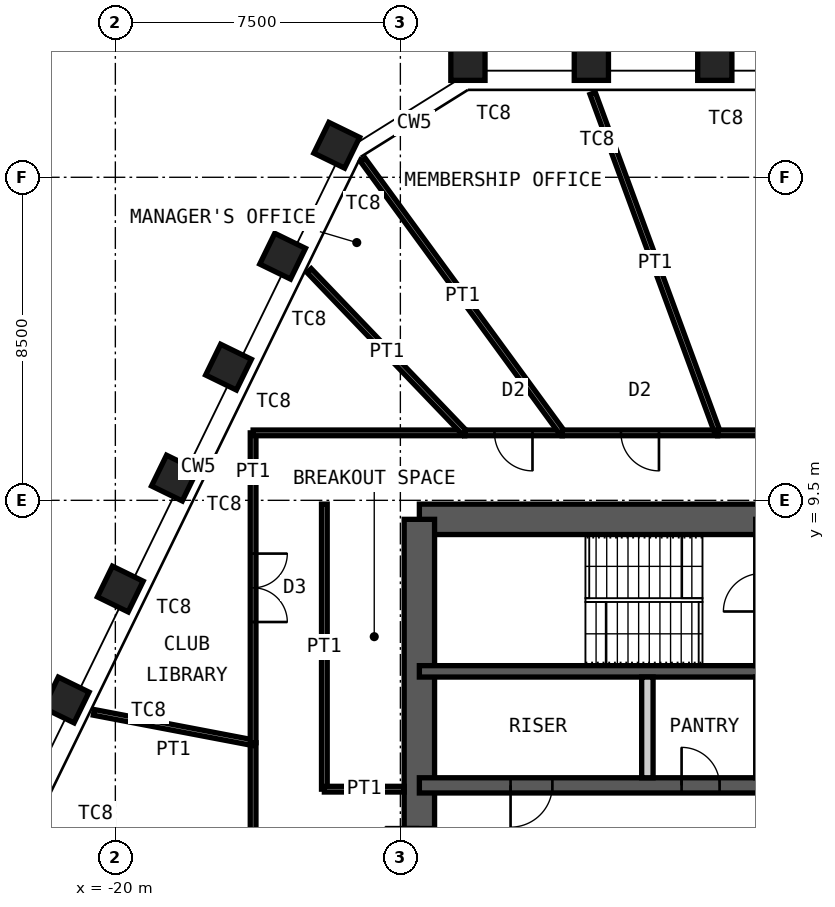
"""IFC4 building model, lengths in metres.
Left out: names, types, materials, properties, quantities, classifications, styles, units other than length and angle.
Written with IfcOpenShell. Run it as: python <this file> out.ifc"""

import sys

from ifc_helpers import new_model, si_unit, direction, frame, frame_2d, origin, origin_2d, place, context, subcontext, project, spatial, rectangle, hollow_rectangle, extrude, element, fill, save


model = new_model("IFC4")
c1 = context("Model", 3, precision=1e-05, world=origin(), true_north=direction((0.0, 1.0)))
c2 = subcontext(c1, "Body", "Model", "MODEL_VIEW")
j1 = project(units=[si_unit("LENGTHUNIT", "METRE"), si_unit("PLANEANGLEUNIT", "RADIAN")], contexts=[c1])
p1 = place(None, origin())
s1 = spatial("IfcSite", under=j1, at=p1, CompositionType="ELEMENT")
p2 = place(p1, origin())
s2 = spatial("IfcBuilding", under=s1, at=p2, CompositionType="ELEMENT")
p3 = place(p2, frame((0.0, 0.0, 320.8)))
s3 = spatial("IfcBuildingStorey", under=s2, at=p3, CompositionType="ELEMENT", Elevation=320.8)
for number, where, z_axis, x_axis in (
    (1, (-10.722, 21.0, 0.0), (0.0, 0.0, 1.0), (-1.0, 0.0, 0.0)),
    (2, (-7.474, 21.0, 0.0), (0.0, 0.0, 1.0), (-1.0, 0.0, 0.0)),
    (3, (-4.226, 21.0, 0.0), (0.0, 0.0, 1.0), (-1.0, 0.0, 0.0)),
    (4, (-21.293, 4.246, 0.0), (0.0, 0.0, 1.0), (-0.438, -0.899, 0.0)),
    (5, (-19.87, 7.166, 0.0), (0.0, 0.0, 1.0), (-0.438, -0.899, 0.0)),
    (6, (-18.446, 10.085, 0.0), (0.0, 0.0, 1.0), (-0.438, -0.899, 0.0)),
    (7, (-17.022, 13.004, 0.0), (0.0, 0.0, 1.0), (-0.438, -0.899, 0.0)),
    (8, (-15.598, 15.924, 0.0), (0.0, 0.0, 1.0), (-0.438, -0.899, 0.0)),
    (9, (-14.174, 18.843, 0.0), (0.0, 0.0, 1.0), (-0.438, -0.899, 0.0)),
):
    element("IfcColumn", number, at=place(p3, frame(where, z_axis=z_axis, x_axis=x_axis)), inside=s3, PredefinedType="COLUMN", context=c2, shape_type="SweptSolid", body=[
        extrude(hollow_rectangle(XDim=0.9, YDim=0.9, WallThickness=0.05, at=origin_2d()), origin(), (0.0, 0.0, 1.0), 4.2),
    ])
p4 = place(p3, frame((-12.0, 9.0, 0.0), z_axis=(0.0, 0.0, 1.0), x_axis=(1.0, 0.0, 0.0)))
e10 = element("IfcWall", 10, at=p4, inside=s3, PredefinedType="SHEAR", context=c2, shape_type="SweptSolid", body=[
    extrude(rectangle(XDim=24.0, YDim=0.8, at=frame_2d((12.0, 0.0))), origin(), (0.0, 0.0, 1.0), 4.2),
])
p5 = place(p4, frame((10.4, 0.0, 0.0)))
e11 = element("IfcOpeningElement", 11, at=p5, cuts=e10, PredefinedType="OPENING", context=c2, shape_type="SweptSolid", body=[
    extrude(rectangle(XDim=1.0, YDim=2.1, at=frame_2d((0.5, 1.05))), frame((0.0, 0.41, 0.0), z_axis=(0.0, -1.0, 0.0), x_axis=(1.0, 0.0, 0.0)), (0.0, 0.0, 1.0), 0.82),
])
p6 = place(p4, frame((17.6, 0.0, 0.0)))
e12 = element("IfcOpeningElement", 12, at=p6, cuts=e10, PredefinedType="OPENING", context=c2, shape_type="SweptSolid", body=[
    extrude(rectangle(XDim=0.9, YDim=2.1, at=frame_2d((0.45, 1.05))), frame((0.0, 0.41, 0.0), z_axis=(0.0, -1.0, 0.0), x_axis=(1.0, 0.0, 0.0)), (0.0, 0.0, 1.0), 0.82),
])
p7 = place(p4, frame((21.9, 0.0, 0.0)))
e13 = element("IfcOpeningElement", 13, at=p7, cuts=e10, PredefinedType="OPENING", context=c2, shape_type="SweptSolid", body=[
    extrude(rectangle(XDim=0.9, YDim=2.1, at=frame_2d((0.45, 1.05))), frame((0.0, 0.41, 0.0), z_axis=(0.0, -1.0, 0.0), x_axis=(1.0, 0.0, 0.0)), (0.0, 0.0, 1.0), 0.82),
])
p8 = place(p3, frame((-12.0, -9.0, 0.0), z_axis=(0.0, 0.0, 1.0), x_axis=(0.0, 1.0, 0.0)))
e14 = element("IfcWall", 14, at=p8, inside=s3, PredefinedType="SHEAR", context=c2, shape_type="SweptSolid", body=[
    extrude(rectangle(XDim=18.0, YDim=0.8, at=frame_2d((9.0, 0.0))), origin(), (0.0, 0.0, 1.0), 4.2),
])
p9 = place(p8, frame((8.1, 0.0, 0.0)))
e15 = element("IfcOpeningElement", 15, at=p9, cuts=e14, PredefinedType="OPENING", context=c2, shape_type="SweptSolid", body=[
    extrude(rectangle(XDim=1.8, YDim=2.1, at=frame_2d((0.9, 1.05))), frame((0.0, 0.41, 0.0), z_axis=(0.0, -1.0, 0.0), x_axis=(1.0, 0.0, 0.0)), (0.0, 0.0, 1.0), 0.82),
])
p10 = place(p3, frame((-12.0, 5.0, 0.0), z_axis=(0.0, 0.0, 1.0), x_axis=(1.0, 0.0, 0.0)))
e16 = element("IfcWall", 16, at=p10, inside=s3, PredefinedType="SHEAR", context=c2, shape_type="SweptSolid", body=[
    extrude(rectangle(XDim=24.0, YDim=0.3, at=frame_2d((12.0, 0.0))), origin(), (0.0, 0.0, 1.0), 4.2),
])
p11 = place(p3, frame((-12.0, 2.0, 0.0), z_axis=(0.0, 0.0, 1.0), x_axis=(1.0, 0.0, 0.0)))
e17 = element("IfcWall", 17, at=p11, inside=s3, PredefinedType="SHEAR", context=c2, shape_type="SweptSolid", body=[
    extrude(rectangle(XDim=24.0, YDim=0.4, at=frame_2d((12.0, 0.0))), origin(), (0.0, 0.0, 1.0), 4.2),
])
p12 = place(p11, frame((2.4, 0.0, 0.0)))
e18 = element("IfcOpeningElement", 18, at=p12, cuts=e17, PredefinedType="OPENING", context=c2, shape_type="SweptSolid", body=[
    extrude(rectangle(XDim=1.1, YDim=2.1, at=frame_2d((0.55, 1.05))), frame((0.0, 0.21, 0.0), z_axis=(0.0, -1.0, 0.0), x_axis=(1.0, 0.0, 0.0)), (0.0, 0.0, 1.0), 0.42),
])
p13 = place(p11, frame((22.0, 0.0, 0.0)))
e19 = element("IfcOpeningElement", 19, at=p13, cuts=e17, PredefinedType="OPENING", context=c2, shape_type="SweptSolid", body=[
    extrude(rectangle(XDim=1.1, YDim=2.1, at=frame_2d((0.55, 1.05))), frame((0.0, 0.21, 0.0), z_axis=(0.0, -1.0, 0.0), x_axis=(1.0, 0.0, 0.0)), (0.0, 0.0, 1.0), 0.42),
])
p14 = place(p11, frame((10.15, 0.0, 0.0)))
e20 = element("IfcOpeningElement", 20, at=p14, cuts=e17, PredefinedType="OPENING", context=c2, shape_type="SweptSolid", body=[
    extrude(rectangle(XDim=1.0, YDim=2.1, at=frame_2d((0.5, 1.05))), frame((0.0, 0.21, 0.0), z_axis=(0.0, -1.0, 0.0), x_axis=(1.0, 0.0, 0.0)), (0.0, 0.0, 1.0), 0.42),
])
p15 = place(p11, frame((6.9, 0.0, 0.0)))
e21 = element("IfcOpeningElement", 21, at=p15, cuts=e17, PredefinedType="OPENING", context=c2, shape_type="SweptSolid", body=[
    extrude(rectangle(XDim=1.0, YDim=2.1, at=frame_2d((0.5, 1.05))), frame((0.0, 0.21, 0.0), z_axis=(0.0, -1.0, 0.0), x_axis=(1.0, 0.0, 0.0)), (0.0, 0.0, 1.0), 0.42),
])
p16 = place(p11, frame((13.35, 0.0, 0.0)))
e22 = element("IfcOpeningElement", 22, at=p16, cuts=e17, PredefinedType="OPENING", context=c2, shape_type="SweptSolid", body=[
    extrude(rectangle(XDim=1.1, YDim=2.4, at=frame_2d((0.55, 1.2))), frame((0.0, 0.21, 0.0), z_axis=(0.0, -1.0, 0.0), x_axis=(1.0, 0.0, 0.0)), (0.0, 0.0, 1.0), 0.42),
])
p17 = place(p11, frame((16.15, 0.0, 0.0)))
e23 = element("IfcOpeningElement", 23, at=p17, cuts=e17, PredefinedType="OPENING", context=c2, shape_type="SweptSolid", body=[
    extrude(rectangle(XDim=1.1, YDim=2.4, at=frame_2d((0.55, 1.2))), frame((0.0, 0.21, 0.0), z_axis=(0.0, -1.0, 0.0), x_axis=(1.0, 0.0, 0.0)), (0.0, 0.0, 1.0), 0.42),
])
p18 = place(p11, frame((19.0, 0.0, 0.0)))
e24 = element("IfcOpeningElement", 24, at=p18, cuts=e17, PredefinedType="OPENING", context=c2, shape_type="SweptSolid", body=[
    extrude(rectangle(XDim=1.0, YDim=2.1, at=frame_2d((0.5, 1.05))), frame((0.0, 0.21, 0.0), z_axis=(0.0, -1.0, 0.0), x_axis=(1.0, 0.0, 0.0)), (0.0, 0.0, 1.0), 0.42),
])
p19 = place(p3, frame((-6.0, 2.2, 0.0), z_axis=(0.0, 0.0, 1.0), x_axis=(0.0, 1.0, 0.0)))
e25 = element("IfcWall", 25, at=p19, inside=s3, PredefinedType="PARTITIONING", context=c2, shape_type="SweptSolid", body=[
    extrude(rectangle(XDim=2.65, YDim=0.3, at=frame_2d((1.325, 0.0))), origin(), (0.0, 0.0, 1.0), 3.98),
])
p20 = place(p3, frame((-16.375, -4.324, 0.0), z_axis=(0.0, 0.0, 1.0), x_axis=(0.0, 1.0, 0.0)))
e26 = element("IfcWall", 26, at=p20, inside=s3, PredefinedType="PARTITIONING", context=c2, shape_type="SweptSolid", body=[
    extrude(rectangle(XDim=7.446, YDim=0.15, at=frame_2d((3.723, 0.0))), origin(), (0.0, 0.0, 1.0), 4.03),
])
p21 = place(p20, frame((3.223, 0.0, 0.0)))
e27 = element("IfcOpeningElement", 27, at=p21, cuts=e26, PredefinedType="OPENING", context=c2, shape_type="SweptSolid", body=[
    extrude(rectangle(XDim=1.0, YDim=2.4, at=frame_2d((0.5, 1.2))), frame((0.0, 0.085, 0.0), z_axis=(0.0, -1.0, 0.0), x_axis=(1.0, 0.0, 0.0)), (0.0, 0.0, 1.0), 0.17),
])
p22 = place(p3, frame((-20.566, 3.921, 0.0), z_axis=(0.0, 0.0, 1.0), x_axis=(0.982305997167, -0.187283015595, 0.0)))
e28 = element("IfcWall", 28, at=p22, inside=s3, PredefinedType="PARTITIONING", context=c2, shape_type="SweptSolid", body=[
    extrude(rectangle(XDim=4.267, YDim=0.15, at=frame_2d((2.133, 0.0))), origin(), (0.0, 0.0, 1.0), 3.33),
])
p23 = place(p3, frame((-16.375, 3.122, 0.0), z_axis=(0.0, 0.0, 1.0), x_axis=(0.0, 1.0, 0.0)))
e29 = element("IfcWall", 29, at=p23, inside=s3, PredefinedType="PARTITIONING", context=c2, shape_type="SweptSolid", body=[
    extrude(rectangle(XDim=8.153, YDim=0.15, at=frame_2d((4.077, 0.0))), origin(), (0.0, 0.0, 1.0), 4.03),
])
p24 = place(p23, frame((3.177, 0.0, 0.0)))
e30 = element("IfcOpeningElement", 30, at=p24, cuts=e29, PredefinedType="OPENING", context=c2, shape_type="SweptSolid", body=[
    extrude(rectangle(XDim=1.8, YDim=2.4, at=frame_2d((0.9, 1.2))), frame((0.0, 0.085, 0.0), z_axis=(0.0, -1.0, 0.0), x_axis=(1.0, 0.0, 0.0)), (0.0, 0.0, 1.0), 0.17),
])
p25 = place(p3, frame((-16.375, 11.275, 0.0), z_axis=(0.0, 0.0, 1.0), x_axis=(1.0, 0.0, 0.0)))
e31 = element("IfcWall", 31, at=p25, inside=s3, PredefinedType="PARTITIONING", context=c2, shape_type="SweptSolid", body=[
    extrude(rectangle(XDim=5.568, YDim=0.15, at=frame_2d((2.784, 0.0))), origin(), (0.0, 0.0, 1.0), 4.03),
])
p26 = place(p3, frame((-14.9, 15.544, 0.0), z_axis=(0.0, 0.0, 1.0), x_axis=(0.691984258941, -0.72191258846, 0.0)))
e32 = element("IfcWall", 32, at=p26, inside=s3, PredefinedType="PARTITIONING", context=c2, shape_type="SweptSolid", body=[
    extrude(rectangle(XDim=5.914, YDim=0.15, at=frame_2d((2.957, 0.0))), origin(), (0.0, 0.0, 1.0), 4.03),
])
p27 = place(p3, frame((-10.807, 11.275, 0.0), z_axis=(0.0, 0.0, 1.0), x_axis=(1.0, 0.0, 0.0)))
e33 = element("IfcWall", 33, at=p27, inside=s3, PredefinedType="PARTITIONING", context=c2, shape_type="SweptSolid", body=[
    extrude(rectangle(XDim=2.568, YDim=0.15, at=frame_2d((1.284, 0.0))), origin(), (0.0, 0.0, 1.0), 4.03),
])
p28 = place(p27, frame((0.784, 0.0, 0.0)))
e34 = element("IfcOpeningElement", 34, at=p28, cuts=e33, PredefinedType="OPENING", context=c2, shape_type="SweptSolid", body=[
    extrude(rectangle(XDim=1.0, YDim=2.4, at=frame_2d((0.5, 1.2))), frame((0.0, 0.085, 0.0), z_axis=(0.0, -1.0, 0.0), x_axis=(1.0, 0.0, 0.0)), (0.0, 0.0, 1.0), 0.17),
])
p29 = place(p3, frame((-13.486, 18.455, 0.0), z_axis=(0.0, 0.0, 1.0), x_axis=(0.589986991866, -0.80741275035, 0.0)))
e35 = element("IfcWall", 35, at=p29, inside=s3, PredefinedType="PARTITIONING", context=c2, shape_type="SweptSolid", body=[
    extrude(rectangle(XDim=8.893, YDim=0.15, at=frame_2d((4.447, 0.0))), origin(), (0.0, 0.0, 1.0), 2.93),
])
p30 = place(p3, frame((-8.239, 11.275, 0.0), z_axis=(0.0, 0.0, 1.0), x_axis=(1.0, 0.0, 0.0)))
e36 = element("IfcWall", 36, at=p30, inside=s3, PredefinedType="PARTITIONING", context=c2, shape_type="SweptSolid", body=[
    extrude(rectangle(XDim=4.088, YDim=0.15, at=frame_2d((2.044, 0.0))), origin(), (0.0, 0.0, 1.0), 4.03),
])
p31 = place(p30, frame((1.544, 0.0, 0.0)))
e37 = element("IfcOpeningElement", 37, at=p31, cuts=e36, PredefinedType="OPENING", context=c2, shape_type="SweptSolid", body=[
    extrude(rectangle(XDim=1.0, YDim=2.4, at=frame_2d((0.5, 1.2))), frame((0.0, 0.085, 0.0), z_axis=(0.0, -1.0, 0.0), x_axis=(1.0, 0.0, 0.0)), (0.0, 0.0, 1.0), 0.17),
])
p32 = place(p3, frame((-7.44, 20.206, 0.0), z_axis=(0.0, 0.0, 1.0), x_axis=(0.345511582319, -0.93841448544, 0.0)))
e38 = element("IfcWall", 38, at=p32, inside=s3, PredefinedType="PARTITIONING", context=c2, shape_type="SweptSolid", body=[
    extrude(rectangle(XDim=9.517, YDim=0.15, at=frame_2d((4.759, 0.0))), origin(), (0.0, 0.0, 1.0), 3.33),
])
p33 = place(p3, frame((-4.151, 11.275, 0.0), z_axis=(0.0, 0.0, 1.0), x_axis=(1.0, 0.0, 0.0)))
e39 = element("IfcWall", 39, at=p33, inside=s3, PredefinedType="PARTITIONING", context=c2, shape_type="SweptSolid", body=[
    extrude(rectangle(XDim=7.216, YDim=0.15, at=frame_2d((3.608, 0.0))), origin(), (0.0, 0.0, 1.0), 4.03),
])
p34 = place(p33, frame((2.708, 0.0, 0.0)))
e40 = element("IfcOpeningElement", 40, at=p34, cuts=e39, PredefinedType="OPENING", context=c2, shape_type="SweptSolid", body=[
    extrude(rectangle(XDim=1.8, YDim=2.4, at=frame_2d((0.9, 1.2))), frame((0.0, 0.085, 0.0), z_axis=(0.0, -1.0, 0.0), x_axis=(1.0, 0.0, 0.0)), (0.0, 0.0, 1.0), 0.17),
])
p35 = place(p3, frame((-14.5, 1.9, 0.0), z_axis=(0.0, 0.0, 1.0), x_axis=(0.0, 1.0, 0.0)))
e41 = element("IfcWall", 41, at=p35, inside=s3, PredefinedType="PARTITIONING", context=c2, shape_type="SweptSolid", body=[
    extrude(rectangle(XDim=7.5, YDim=0.15, at=frame_2d((3.75, 0.0))), origin(), (0.0, 0.0, 1.0), 4.03),
])
p36 = place(p3, frame((-12.4, 1.9, 0.0), z_axis=(0.0, 0.0, 1.0), x_axis=(-1.0, 0.0, 0.0)))
e42 = element("IfcWall", 42, at=p36, inside=s3, PredefinedType="PARTITIONING", context=c2, shape_type="SweptSolid", body=[
    extrude(rectangle(XDim=2.1, YDim=0.15, at=frame_2d((1.05, 0.0))), origin(), (0.0, 0.0, 1.0), 3.53),
])
p37 = place(p12, origin())
e43 = element("IfcDoor", 43, at=p37, inside=s3, OperationType="SINGLE_SWING_LEFT", PredefinedType="DOOR", context=c2, shape_type="SweptSolid", body=[
    extrude(rectangle(XDim=1.1, YDim=2.1, at=frame_2d((0.55, 1.05))), frame((0.0, 0.025, 0.0), z_axis=(0.0, -1.0, 0.0), x_axis=(1.0, 0.0, 0.0)), (0.0, 0.0, 1.0), 0.05),
])
fill(e18, e43)
p38 = place(p9, origin())
e44 = element("IfcDoor", 44, at=p38, inside=s3, OperationType="DOUBLE_DOOR_DOUBLE_SWING", PredefinedType="DOOR", context=c2, shape_type="SweptSolid", body=[
    extrude(rectangle(XDim=1.8, YDim=2.1, at=frame_2d((0.9, 1.05))), frame((0.0, 0.025, 0.0), z_axis=(0.0, -1.0, 0.0), x_axis=(1.0, 0.0, 0.0)), (0.0, 0.0, 1.0), 0.05),
])
fill(e15, e44)
p39 = place(p15, origin())
e45 = element("IfcDoor", 45, at=p39, inside=s3, OperationType="SINGLE_SWING_RIGHT", PredefinedType="DOOR", context=c2, shape_type="SweptSolid", body=[
    extrude(rectangle(XDim=1.0, YDim=2.1, at=frame_2d((0.5, 1.05))), frame((0.0, 0.025, 0.0), z_axis=(0.0, -1.0, 0.0), x_axis=(1.0, 0.0, 0.0)), (0.0, 0.0, 1.0), 0.05),
])
fill(e21, e45)
p40 = place(p24, origin())
e46 = element("IfcDoor", 46, at=p40, inside=s3, OperationType="DOUBLE_DOOR_DOUBLE_SWING", PredefinedType="DOOR", context=c2, shape_type="SweptSolid", body=[
    extrude(rectangle(XDim=1.8, YDim=2.4, at=frame_2d((0.9, 1.2))), frame((0.0, 0.025, 0.0), z_axis=(0.0, -1.0, 0.0), x_axis=(1.0, 0.0, 0.0)), (0.0, 0.0, 1.0), 0.05),
])
fill(e30, e46)
p41 = place(p28, origin())
e47 = element("IfcDoor", 47, at=p41, inside=s3, OperationType="SINGLE_SWING_RIGHT", PredefinedType="DOOR", context=c2, shape_type="SweptSolid", body=[
    extrude(rectangle(XDim=1.0, YDim=2.4, at=frame_2d((0.5, 1.2))), frame((0.0, 0.025, 0.0), z_axis=(0.0, -1.0, 0.0), x_axis=(1.0, 0.0, 0.0)), (0.0, 0.0, 1.0), 0.05),
])
fill(e34, e47)
p42 = place(p31, origin())
e48 = element("IfcDoor", 48, at=p42, inside=s3, OperationType="SINGLE_SWING_RIGHT", PredefinedType="DOOR", context=c2, shape_type="SweptSolid", body=[
    extrude(rectangle(XDim=1.0, YDim=2.4, at=frame_2d((0.5, 1.2))), frame((0.0, 0.025, 0.0), z_axis=(0.0, -1.0, 0.0), x_axis=(1.0, 0.0, 0.0)), (0.0, 0.0, 1.0), 0.05),
])
fill(e37, e48)
save(model, sys.argv[1])
